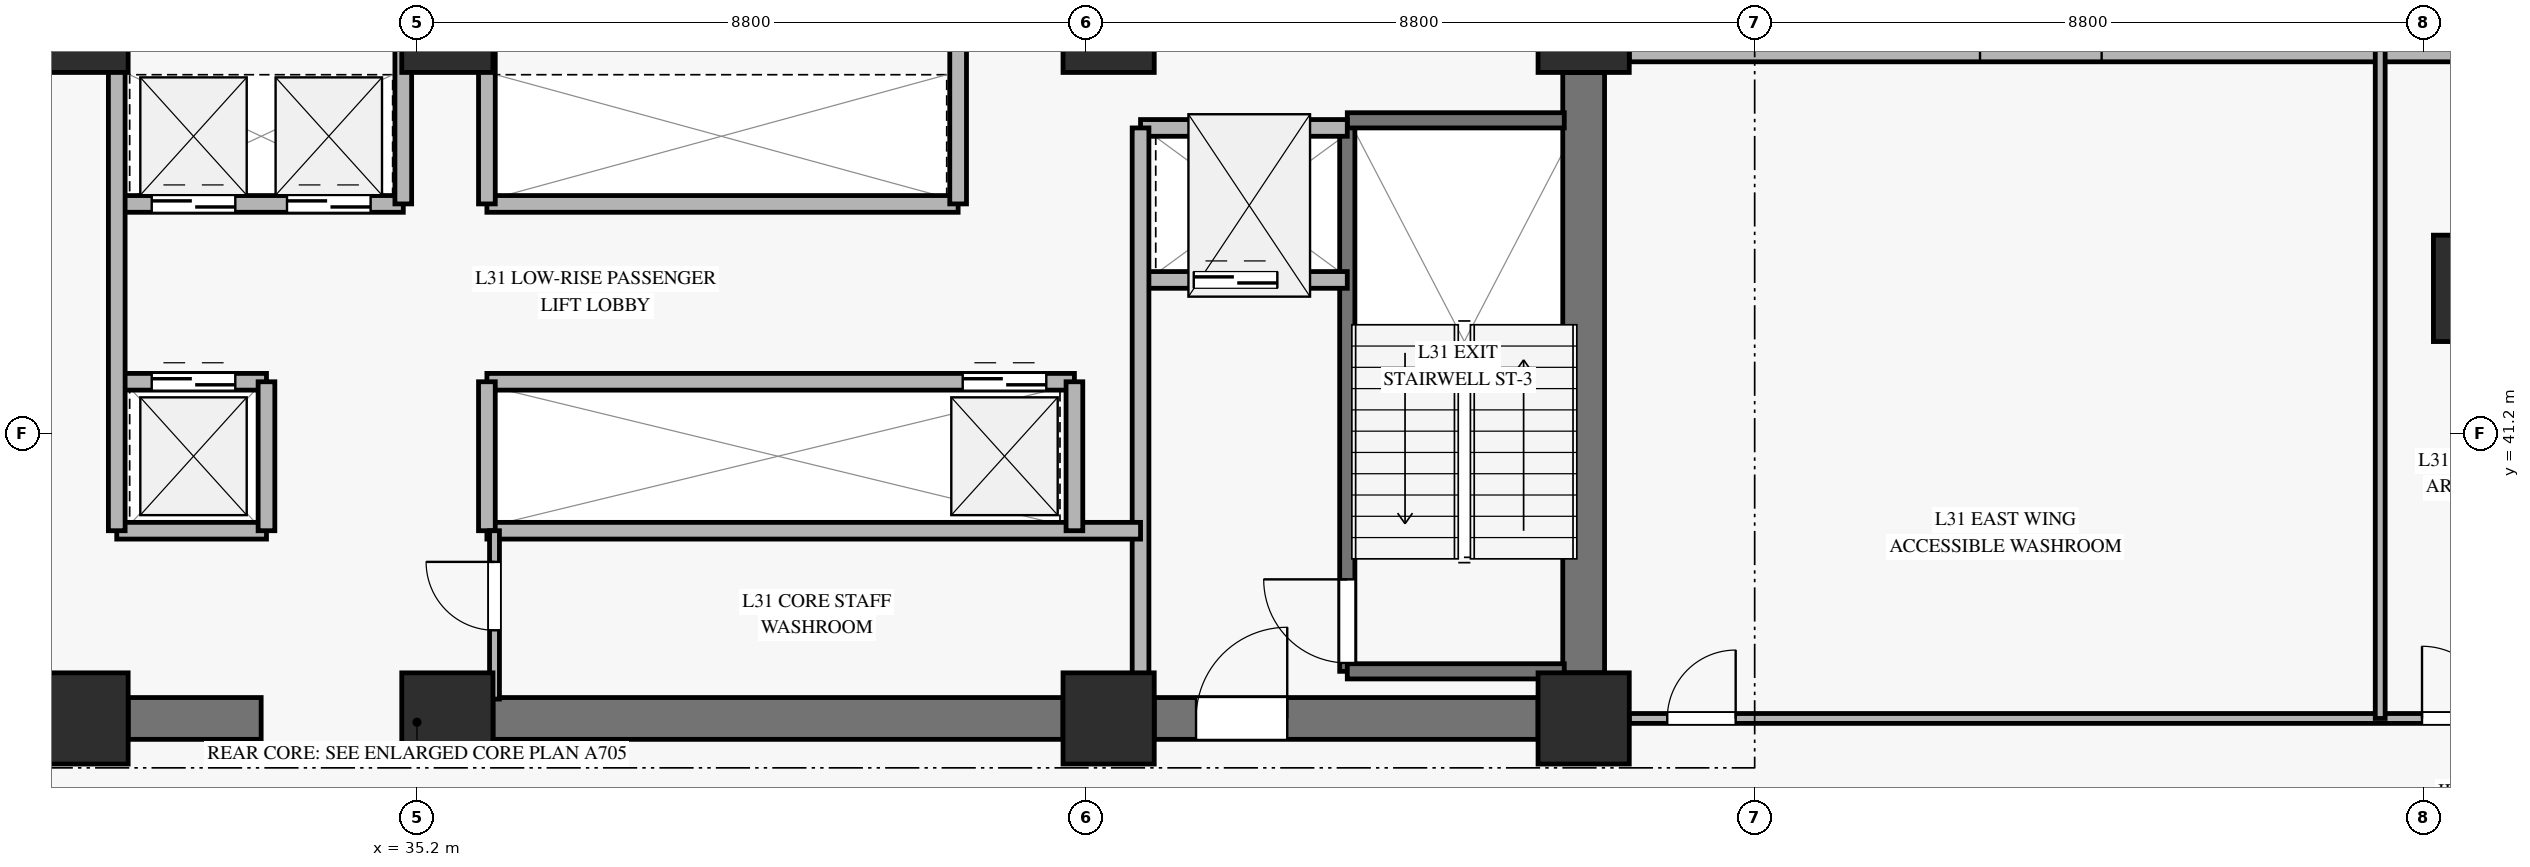
"""IFC4 building model, lengths in metres.
Left out: names, types, materials, properties, quantities, classifications, styles, units other than length and angle.
Written with IfcOpenShell. Run it as: python <this file> out.ifc"""

import sys

from ifc_helpers import new_model, si_unit, direction, frame, frame_2d, origin, origin_2d, place, context, subcontext, project, spatial, rectangle, hollow_rectangle, extrude, source, transform, mapped, element, fill, save


model = new_model("IFC4")
c1 = context("Model", 3, precision=1e-05, world=origin(), true_north=direction((0.0, 1.0)))
c2 = subcontext(c1, "Body", "Model", "MODEL_VIEW")
j1 = project(units=[si_unit("LENGTHUNIT", "METRE"), si_unit("PLANEANGLEUNIT", "RADIAN")], contexts=[c1])
p1 = place(None, origin())
s1 = spatial("IfcSite", under=j1, at=p1, CompositionType="ELEMENT")
p2 = place(p1, origin())
s2 = spatial("IfcBuilding", under=s1, at=p2, CompositionType="ELEMENT")
p3 = place(p2, frame((0.0, 0.0, 127.0)))
s3 = spatial("IfcBuildingStorey", under=s2, at=p3, CompositionType="ELEMENT", Elevation=127.0)
m1 = source(origin(), c2, "Body", "SweptSolid", [
    extrude(rectangle(XDim=1.2, YDim=1.2, at=origin_2d()), origin(), (0.0, 0.0, 1.0), 3.64),
])
for number, where, z_axis, x_axis in (
    (1, (30.8, 37.45, 0.0), (0.0, 0.0, 1.0), (1.0, 0.0, 0.0)),
    (2, (30.8, 46.55, 0.0), (0.0, 0.0, 1.0), (1.0, 0.0, 0.0)),
    (3, (35.6, 37.45, 0.0), (0.0, 0.0, 1.0), (1.0, 0.0, 0.0)),
    (4, (35.6, 46.55, 0.0), (0.0, 0.0, 1.0), (1.0, 0.0, 0.0)),
    (5, (44.3, 37.45, 0.0), (0.0, 0.0, 1.0), (1.0, 0.0, 0.0)),
    (6, (44.3, 46.55, 0.0), (0.0, 0.0, 1.0), (1.0, 0.0, 0.0)),
    (7, (50.55, 37.45, 0.0), (0.0, 0.0, 1.0), (1.0, 0.0, 0.0)),
    (8, (50.55, 46.55, 0.0), (0.0, 0.0, 1.0), (1.0, 0.0, 0.0)),
):
    element("IfcColumn", number, at=place(p3, frame(where, z_axis=z_axis, x_axis=x_axis)), inside=s3, PredefinedType="PILASTER", context=c2, shape_type="MappedRepresentation", body=[
        mapped(m1, transform((0.0, 0.0, 0.0), x_axis=(1.0, 0.0, 0.0), y_axis=(0.0, 1.0, 0.0), z_axis=(0.0, 0.0, 1.0), scale=1.0)),
    ])
p4 = place(p3, frame((31.4, 37.45, 0.0), z_axis=(0.0, 0.0, 1.0), x_axis=(1.0, 0.0, 0.0)))
e9 = element("IfcWall", 9, at=p4, inside=s3, PredefinedType="SHEAR", context=c2, shape_type="SweptSolid", body=[
    extrude(rectangle(XDim=1.75, YDim=0.55, at=frame_2d((0.875, 0.0))), origin(), (0.0, 0.0, 1.0), 3.64),
])
p5 = place(p3, frame((36.2, 37.45, 0.0), z_axis=(0.0, 0.0, 1.0), x_axis=(1.0, 0.0, 0.0)))
e10 = element("IfcWall", 10, at=p5, inside=s3, PredefinedType="SHEAR", context=c2, shape_type="SweptSolid", body=[
    extrude(rectangle(XDim=7.5, YDim=0.55, at=frame_2d((3.75, 0.0))), origin(), (0.0, 0.0, 1.0), 3.64),
])
p6 = place(p3, frame((44.9, 37.45, 0.0), z_axis=(0.0, 0.0, 1.0), x_axis=(1.0, 0.0, 0.0)))
e11 = element("IfcWall", 11, at=p6, inside=s3, PredefinedType="SHEAR", context=c2, shape_type="SweptSolid", body=[
    extrude(rectangle(XDim=5.05, YDim=0.55, at=frame_2d((2.525, 0.0))), origin(), (0.0, 0.0, 1.0), 3.64),
])
p7 = place(p6, frame((0.55, 0.0, 0.0)))
e12 = element("IfcOpeningElement", 12, at=p7, cuts=e11, PredefinedType="OPENING", context=c2, shape_type="SweptSolid", body=[
    extrude(rectangle(XDim=1.2, YDim=2.15, at=frame_2d((0.6, 1.075))), frame((0.0, 0.285, 0.0), z_axis=(0.0, -1.0, 0.0), x_axis=(1.0, 0.0, 0.0)), (0.0, 0.0, 1.0), 0.57),
])
p8 = place(p3, frame((50.55, 38.05, 0.0), z_axis=(0.0, 0.0, 1.0), x_axis=(0.0, 1.0, 0.0)))
e13 = element("IfcWall", 13, at=p8, inside=s3, PredefinedType="SHEAR", context=c2, shape_type="SweptSolid", body=[
    extrude(rectangle(XDim=7.9, YDim=0.55, at=frame_2d((3.95, 0.0))), origin(), (0.0, 0.0, 1.0), 3.64),
])
m2 = source(origin(), c2, "Body", "SweptSolid", [
    extrude(hollow_rectangle(XDim=1.4, YDim=1.4, WallThickness=0.065, at=origin_2d()), origin(), (0.0, 0.0, 1.0), 3.64),
])
p9 = place(p3, frame((62.43, 43.109, 0.0), z_axis=(0.0, 0.0, 1.0), x_axis=(1.0, 0.0, 0.0)))
e14 = element("IfcColumn", 14, at=p9, inside=s3, PredefinedType="COLUMN", context=c2, shape_type="MappedRepresentation", body=[
    mapped(m2, transform((0.0, 0.0, 0.0), x_axis=(1.0, 0.0, 0.0), y_axis=(0.0, 1.0, 0.0), z_axis=(0.0, 0.0, 1.0), scale=1.0)),
])
p10 = place(p3, frame((51.15, 46.25, 0.0), z_axis=(0.0, 0.0, 1.0), x_axis=(1.0, 0.0, 0.0)))
e15 = element("IfcWall", 15, at=p10, inside=s3, PredefinedType="SOLIDWALL", context=c2, shape_type="SweptSolid", body=[
    extrude(rectangle(XDim=10.83, YDim=0.32, at=frame_2d((5.415, 0.0))), origin(), (0.0, 0.0, 1.0), 3.12),
])
p11 = place(p10, frame((4.615, 0.0, 0.45)))
e16 = element("IfcOpeningElement", 16, at=p11, cuts=e15, PredefinedType="OPENING", context=c2, shape_type="SweptSolid", body=[
    extrude(rectangle(XDim=1.6, YDim=2.0, at=frame_2d((0.8, 1.0))), frame((0.0, 0.17, 0.0), z_axis=(0.0, -1.0, 0.0), x_axis=(1.0, 0.0, 0.0)), (0.0, 0.0, 1.0), 0.34),
])
p12 = place(p3, frame((47.44, 38.07, 0.0), z_axis=(0.0, 0.0, 1.0), x_axis=(0.0, 1.0, 0.0)))
e17 = element("IfcWall", 17, at=p12, inside=s3, PredefinedType="SOLIDWALL", context=c2, shape_type="SweptSolid", body=[
    extrude(rectangle(XDim=7.25, YDim=0.2, at=frame_2d((3.625, 0.0))), origin(), (0.0, 0.0, 1.0), 3.9),
])
p13 = place(p12, frame((0.11, 0.0, 0.0)))
e18 = element("IfcOpeningElement", 18, at=p13, cuts=e17, PredefinedType="OPENING", context=c2, shape_type="SweptSolid", body=[
    extrude(rectangle(XDim=1.1, YDim=2.15, at=frame_2d((0.55, 1.075))), frame((0.0, 0.11, 0.0), z_axis=(0.0, -1.0, 0.0), x_axis=(1.0, 0.0, 0.0)), (0.0, 0.0, 1.0), 0.22),
])
for number, where, z_axis, x_axis in (
    (19, (47.44, 45.32, 0.0), (0.0, 0.0, 1.0), (1.0, 0.0, 0.0)),
    (20, (47.44, 38.07, 0.0), (0.0, 0.0, 1.0), (1.0, 0.0, 0.0)),
):
    element("IfcWall", number, at=place(p3, frame(where, z_axis=z_axis, x_axis=x_axis)), inside=s3, PredefinedType="SOLIDWALL", context=c2, shape_type="SweptSolid", body=[
        extrude(rectangle(XDim=2.855, YDim=0.2, at=frame_2d((1.427, 0.0))), origin(), (0.0, 0.0, 1.0), 3.9),
    ])
p14 = place(p3, frame((44.72, 43.22, 0.0), z_axis=(0.0, 0.0, 1.0), x_axis=(1.0, 0.0, 0.0)))
e21 = element("IfcWall", 21, at=p14, inside=s3, PredefinedType="SOLIDWALL", context=c2, shape_type="SweptSolid", body=[
    extrude(rectangle(XDim=2.72, YDim=0.22, at=frame_2d((1.36, 0.0))), origin(), (0.0, 0.0, 1.0), 3.64),
])
p15 = place(p14, frame((0.7, 0.0, 0.0)))
e22 = element("IfcOpeningElement", 22, at=p15, cuts=e21, PredefinedType="OPENING", context=c2, shape_type="SweptSolid", body=[
    extrude(rectangle(XDim=1.1, YDim=2.2, at=frame_2d((0.55, 1.1))), frame((0.0, 0.12, 0.0), z_axis=(0.0, -1.0, 0.0), x_axis=(1.0, 0.0, 0.0)), (0.0, 0.0, 1.0), 0.24),
])
p16 = place(p3, frame((44.72, 45.22, 0.0), z_axis=(0.0, 0.0, 1.0), x_axis=(1.0, 0.0, 0.0)))
e23 = element("IfcWall", 23, at=p16, inside=s3, PredefinedType="SOLIDWALL", context=c2, shape_type="SweptSolid", body=[
    extrude(rectangle(XDim=2.72, YDim=0.22, at=frame_2d((1.36, 0.0))), origin(), (0.0, 0.0, 1.0), 3.64),
])
p17 = place(p3, frame((44.72, 37.705, 0.0), z_axis=(0.0, 0.0, 1.0), x_axis=(0.0, 1.0, 0.0)))
e24 = element("IfcWall", 24, at=p17, inside=s3, PredefinedType="SOLIDWALL", context=c2, shape_type="SweptSolid", body=[
    extrude(rectangle(XDim=7.515, YDim=0.22, at=frame_2d((3.757, 0.0))), origin(), (0.0, 0.0, 1.0), 3.64),
])
p18 = place(p3, frame((31.25, 44.22, 0.0), z_axis=(0.0, 0.0, 1.0), x_axis=(1.0, 0.0, 0.0)))
e25 = element("IfcWall", 25, at=p18, inside=s3, PredefinedType="SOLIDWALL", context=c2, shape_type="SweptSolid", body=[
    extrude(rectangle(XDim=3.77, YDim=0.22, at=frame_2d((1.885, 0.0))), origin(), (0.0, 0.0, 1.0), 3.64),
])
p19 = place(p18, frame((0.46, 0.0, 0.0)))
e26 = element("IfcOpeningElement", 26, at=p19, cuts=e25, PredefinedType="OPENING", context=c2, shape_type="SweptSolid", body=[
    extrude(rectangle(XDim=1.1, YDim=2.2, at=frame_2d((0.55, 1.1))), frame((0.0, 0.12, 0.0), z_axis=(0.0, -1.0, 0.0), x_axis=(1.0, 0.0, 0.0)), (0.0, 0.0, 1.0), 0.24),
])
p20 = place(p18, frame((2.24, 0.0, 0.0)))
e27 = element("IfcOpeningElement", 27, at=p20, cuts=e25, PredefinedType="OPENING", context=c2, shape_type="SweptSolid", body=[
    extrude(rectangle(XDim=1.1, YDim=2.2, at=frame_2d((0.55, 1.1))), frame((0.0, 0.12, 0.0), z_axis=(0.0, -1.0, 0.0), x_axis=(1.0, 0.0, 0.0)), (0.0, 0.0, 1.0), 0.24),
])
p21 = place(p3, frame((36.12, 44.22, 0.0), z_axis=(0.0, 0.0, 1.0), x_axis=(1.0, 0.0, 0.0)))
e28 = element("IfcWall", 28, at=p21, inside=s3, PredefinedType="SOLIDWALL", context=c2, shape_type="SweptSolid", body=[
    extrude(rectangle(XDim=6.2, YDim=0.22, at=frame_2d((3.1, 0.0))), origin(), (0.0, 0.0, 1.0), 3.64),
])
for number, where, z_axis, x_axis in (
    (29, (35.02, 44.22, 0.0), (0.0, 0.0, 1.0), (0.0, 1.0, 0.0)),
    (30, (36.12, 44.22, 0.0), (0.0, 0.0, 1.0), (0.0, 1.0, 0.0)),
    (31, (42.32, 44.22, 0.0), (0.0, 0.0, 1.0), (0.0, 1.0, 0.0)),
):
    element("IfcWall", number, at=place(p3, frame(where, z_axis=z_axis, x_axis=x_axis)), inside=s3, PredefinedType="SOLIDWALL", context=c2, shape_type="SweptSolid", body=[
        extrude(rectangle(XDim=2.075, YDim=0.22, at=frame_2d((1.038, 0.0))), origin(), (0.0, 0.0, 1.0), 3.64),
    ])
p22 = place(p3, frame((31.25, 41.88, 0.0), z_axis=(0.0, 0.0, 1.0), x_axis=(1.0, 0.0, 0.0)))
e32 = element("IfcWall", 32, at=p22, inside=s3, PredefinedType="SOLIDWALL", context=c2, shape_type="SweptSolid", body=[
    extrude(rectangle(XDim=1.97, YDim=0.22, at=frame_2d((0.985, 0.0))), origin(), (0.0, 0.0, 1.0), 3.64),
])
p23 = place(p22, frame((0.46, 0.0, 0.0)))
e33 = element("IfcOpeningElement", 33, at=p23, cuts=e32, PredefinedType="OPENING", context=c2, shape_type="SweptSolid", body=[
    extrude(rectangle(XDim=1.1, YDim=2.2, at=frame_2d((0.55, 1.1))), frame((0.0, 0.12, 0.0), z_axis=(0.0, -1.0, 0.0), x_axis=(1.0, 0.0, 0.0)), (0.0, 0.0, 1.0), 0.24),
])
p24 = place(p3, frame((36.12, 41.88, 0.0), z_axis=(0.0, 0.0, 1.0), x_axis=(1.0, 0.0, 0.0)))
e34 = element("IfcWall", 34, at=p24, inside=s3, PredefinedType="SOLIDWALL", context=c2, shape_type="SweptSolid", body=[
    extrude(rectangle(XDim=7.73, YDim=0.22, at=frame_2d((3.865, 0.0))), origin(), (0.0, 0.0, 1.0), 3.64),
])
p25 = place(p24, frame((6.26, 0.0, 0.0)))
e35 = element("IfcOpeningElement", 35, at=p25, cuts=e34, PredefinedType="OPENING", context=c2, shape_type="SweptSolid", body=[
    extrude(rectangle(XDim=1.1, YDim=2.2, at=frame_2d((0.55, 1.1))), frame((0.0, 0.12, 0.0), z_axis=(0.0, -1.0, 0.0), x_axis=(1.0, 0.0, 0.0)), (0.0, 0.0, 1.0), 0.24),
])
p26 = place(p3, frame((31.25, 39.92, 0.0), z_axis=(0.0, 0.0, 1.0), x_axis=(1.0, 0.0, 0.0)))
e36 = element("IfcWall", 36, at=p26, inside=s3, PredefinedType="SOLIDWALL", context=c2, shape_type="SweptSolid", body=[
    extrude(rectangle(XDim=1.97, YDim=0.22, at=frame_2d((0.985, 0.0))), origin(), (0.0, 0.0, 1.0), 3.64),
])
p27 = place(p3, frame((33.22, 39.92, 0.0), z_axis=(0.0, 0.0, 1.0), x_axis=(0.0, 1.0, 0.0)))
e37 = element("IfcWall", 37, at=p27, inside=s3, PredefinedType="SOLIDWALL", context=c2, shape_type="SweptSolid", body=[
    extrude(rectangle(XDim=1.96, YDim=0.22, at=frame_2d((0.98, 0.0))), origin(), (0.0, 0.0, 1.0), 3.64),
])
p28 = place(p3, frame((36.12, 39.92, 0.0), z_axis=(0.0, 0.0, 1.0), x_axis=(1.0, 0.0, 0.0)))
e38 = element("IfcWall", 38, at=p28, inside=s3, PredefinedType="SOLIDWALL", context=c2, shape_type="SweptSolid", body=[
    extrude(rectangle(XDim=8.6, YDim=0.22, at=frame_2d((4.3, 0.0))), origin(), (0.0, 0.0, 1.0), 2.925),
])
p29 = place(p3, frame((36.12, 39.92, 0.0), z_axis=(0.0, 0.0, 1.0), x_axis=(0.0, 1.0, 0.0)))
e39 = element("IfcWall", 39, at=p29, inside=s3, PredefinedType="SOLIDWALL", context=c2, shape_type="SweptSolid", body=[
    extrude(rectangle(XDim=1.96, YDim=0.22, at=frame_2d((0.98, 0.0))), origin(), (0.0, 0.0, 1.0), 3.64),
])
p30 = place(p3, frame((31.25, 39.92, 0.0), z_axis=(0.0, 0.0, 1.0), x_axis=(0.0, 1.0, 0.0)))
e40 = element("IfcWall", 40, at=p30, inside=s3, PredefinedType="SOLIDWALL", context=c2, shape_type="SweptSolid", body=[
    extrude(rectangle(XDim=6.375, YDim=0.22, at=frame_2d((3.188, 0.0))), origin(), (0.0, 0.0, 1.0), 3.64),
])
p31 = place(p3, frame((43.85, 39.92, 0.0), z_axis=(0.0, 0.0, 1.0), x_axis=(0.0, 1.0, 0.0)))
e41 = element("IfcWall", 41, at=p31, inside=s3, PredefinedType="SOLIDWALL", context=c2, shape_type="SweptSolid", body=[
    extrude(rectangle(XDim=1.96, YDim=0.22, at=frame_2d((0.98, 0.0))), origin(), (0.0, 0.0, 1.0), 3.64),
])
p32 = place(p3, frame((36.22, 37.705, 0.0), z_axis=(0.0, 0.0, 1.0), x_axis=(0.0, 1.0, 0.0)))
e42 = element("IfcWall", 42, at=p32, inside=s3, PredefinedType="PARTITIONING", context=c2, shape_type="SweptSolid", body=[
    extrude(rectangle(XDim=2.215, YDim=0.13, at=frame_2d((1.107, 0.0))), origin(), (0.0, 0.0, 1.0), 3.64),
])
p33 = place(p32, frame((0.905, 0.0, 0.0)))
e43 = element("IfcOpeningElement", 43, at=p33, cuts=e42, PredefinedType="OPENING", context=c2, shape_type="SweptSolid", body=[
    extrude(rectangle(XDim=0.9, YDim=2.1, at=frame_2d((0.45, 1.05))), frame((0.0, 0.075, 0.0), z_axis=(0.0, -1.0, 0.0), x_axis=(1.0, 0.0, 0.0)), (0.0, 0.0, 1.0), 0.15),
])
p34 = place(p3, frame((51.15, 37.45, 0.0), z_axis=(0.0, 0.0, 1.0), x_axis=(1.0, 0.0, 0.0)))
e44 = element("IfcWall", 44, at=p34, inside=s3, PredefinedType="PARTITIONING", context=c2, shape_type="SweptSolid", body=[
    extrude(rectangle(XDim=14.271, YDim=0.13, at=frame_2d((7.135, 0.0))), origin(), (0.0, 0.0, 1.0), 3.125),
])
p35 = place(p34, frame((0.5, 0.0, 0.0)))
e45 = element("IfcOpeningElement", 45, at=p35, cuts=e44, PredefinedType="OPENING", context=c2, shape_type="SweptSolid", body=[
    extrude(rectangle(XDim=0.9, YDim=2.1, at=frame_2d((0.45, 1.05))), frame((0.0, 0.075, 0.0), z_axis=(0.0, -1.0, 0.0), x_axis=(1.0, 0.0, 0.0)), (0.0, 0.0, 1.0), 0.15),
])
p36 = place(p34, frame((10.43, 0.0, 0.0)))
e46 = element("IfcOpeningElement", 46, at=p36, cuts=e44, PredefinedType="OPENING", context=c2, shape_type="SweptSolid", body=[
    extrude(rectangle(XDim=0.95, YDim=2.1, at=frame_2d((0.475, 1.05))), frame((0.0, 0.075, 0.0), z_axis=(0.0, -1.0, 0.0), x_axis=(1.0, 0.0, 0.0)), (0.0, 0.0, 1.0), 0.15),
])
p37 = place(p3, frame((61.03, 37.45, 0.0), z_axis=(0.0, 0.0, 1.0), x_axis=(0.0, 1.0, 0.0)))
e47 = element("IfcWall", 47, at=p37, inside=s3, PredefinedType="PARTITIONING", context=c2, shape_type="SweptSolid", body=[
    extrude(rectangle(XDim=8.8, YDim=0.13, at=frame_2d((4.4, 0.0))), origin(), (0.0, 0.0, 1.0), 3.64),
])
m3 = source(origin(), c2, "Body", "SweptSolid", [
    extrude(rectangle(XDim=1.1, YDim=2.15, at=frame_2d((0.55, 1.075))), frame((0.0, 0.025, 0.0), z_axis=(0.0, -1.0, 0.0), x_axis=(1.0, 0.0, 0.0)), (0.0, 0.0, 1.0), 0.05),
])
p38 = place(p13, origin())
e48 = element("IfcDoor", 48, at=p38, inside=s3, OperationType="SINGLE_SWING_RIGHT", PredefinedType="DOOR", context=c2, shape_type="MappedRepresentation", body=[
    mapped(m3, transform((0.0, 0.0, 0.0), x_axis=(1.0, 0.0, 0.0), y_axis=(0.0, 1.0, 0.0), z_axis=(0.0, 0.0, 1.0), scale=1.0)),
])
fill(e18, e48)
m4 = source(origin(), c2, "Body", "SweptSolid", [
    extrude(rectangle(XDim=1.1, YDim=2.2, at=frame_2d((0.55, 1.1))), frame((0.0, 0.025, 0.0), z_axis=(0.0, -1.0, 0.0), x_axis=(1.0, 0.0, 0.0)), (0.0, 0.0, 1.0), 0.05),
])
p39 = place(p15, origin())
e49 = element("IfcDoor", 49, at=p39, inside=s3, OperationType="SLIDING_TO_LEFT", PredefinedType="DOOR", context=c2, shape_type="MappedRepresentation", body=[
    mapped(m4, transform((0.0, 0.0, 0.0), x_axis=(1.0, 0.0, 0.0), y_axis=(0.0, 1.0, 0.0), z_axis=(0.0, 0.0, 1.0), scale=1.0)),
])
fill(e22, e49)
m5 = source(origin(), c2, "Body", "SweptSolid", [
    extrude(rectangle(XDim=1.2, YDim=2.15, at=frame_2d((0.6, 1.075))), frame((0.0, 0.025, 0.0), z_axis=(0.0, -1.0, 0.0), x_axis=(1.0, 0.0, 0.0)), (0.0, 0.0, 1.0), 0.05),
])
p40 = place(p7, origin())
e50 = element("IfcDoor", 50, at=p40, inside=s3, OperationType="SINGLE_SWING_RIGHT", PredefinedType="DOOR", context=c2, shape_type="MappedRepresentation", body=[
    mapped(m5, transform((0.0, 0.0, 0.0), x_axis=(1.0, 0.0, 0.0), y_axis=(0.0, 1.0, 0.0), z_axis=(0.0, 0.0, 1.0), scale=1.0)),
])
fill(e12, e50)
p41 = place(p19, origin())
e51 = element("IfcDoor", 51, at=p41, inside=s3, OperationType="SLIDING_TO_LEFT", PredefinedType="DOOR", context=c2, shape_type="MappedRepresentation", body=[
    mapped(m4, transform((0.0, 0.0, 0.0), x_axis=(1.0, 0.0, 0.0), y_axis=(0.0, 1.0, 0.0), z_axis=(0.0, 0.0, 1.0), scale=1.0)),
])
fill(e26, e51)
p42 = place(p20, origin())
e52 = element("IfcDoor", 52, at=p42, inside=s3, OperationType="SLIDING_TO_LEFT", PredefinedType="DOOR", context=c2, shape_type="MappedRepresentation", body=[
    mapped(m4, transform((0.0, 0.0, 0.0), x_axis=(1.0, 0.0, 0.0), y_axis=(0.0, 1.0, 0.0), z_axis=(0.0, 0.0, 1.0), scale=1.0)),
])
fill(e27, e52)
p43 = place(p23, origin())
e53 = element("IfcDoor", 53, at=p43, inside=s3, OperationType="SLIDING_TO_LEFT", PredefinedType="DOOR", context=c2, shape_type="MappedRepresentation", body=[
    mapped(m4, transform((0.0, 0.0, 0.0), x_axis=(1.0, 0.0, 0.0), y_axis=(0.0, 1.0, 0.0), z_axis=(0.0, 0.0, 1.0), scale=1.0)),
])
fill(e33, e53)
p44 = place(p25, origin())
e54 = element("IfcDoor", 54, at=p44, inside=s3, OperationType="SLIDING_TO_LEFT", PredefinedType="DOOR", context=c2, shape_type="MappedRepresentation", body=[
    mapped(m4, transform((0.0, 0.0, 0.0), x_axis=(1.0, 0.0, 0.0), y_axis=(0.0, 1.0, 0.0), z_axis=(0.0, 0.0, 1.0), scale=1.0)),
])
fill(e35, e54)
m6 = source(origin(), c2, "Body", "SweptSolid", [
    extrude(rectangle(XDim=0.9, YDim=2.1, at=frame_2d((0.45, 1.05))), frame((0.0, 0.025, 0.0), z_axis=(0.0, -1.0, 0.0), x_axis=(1.0, 0.0, 0.0)), (0.0, 0.0, 1.0), 0.05),
])
p45 = place(p33, origin())
e55 = element("IfcDoor", 55, at=p45, inside=s3, OperationType="SINGLE_SWING_RIGHT", PredefinedType="DOOR", context=c2, shape_type="MappedRepresentation", body=[
    mapped(m6, transform((0.0, 0.0, 0.0), x_axis=(1.0, 0.0, 0.0), y_axis=(0.0, 1.0, 0.0), z_axis=(0.0, 0.0, 1.0), scale=1.0)),
])
fill(e43, e55)
p46 = place(p35, origin())
e56 = element("IfcDoor", 56, at=p46, inside=s3, OperationType="SINGLE_SWING_RIGHT", PredefinedType="DOOR", context=c2, shape_type="MappedRepresentation", body=[
    mapped(m6, transform((0.0, 0.0, 0.0), x_axis=(1.0, 0.0, 0.0), y_axis=(0.0, 1.0, 0.0), z_axis=(0.0, 0.0, 1.0), scale=1.0)),
])
fill(e45, e56)
m7 = source(origin(), c2, "Body", "SweptSolid", [
    extrude(rectangle(XDim=0.95, YDim=2.1, at=frame_2d((0.475, 1.05))), frame((0.0, 0.025, 0.0), z_axis=(0.0, -1.0, 0.0), x_axis=(1.0, 0.0, 0.0)), (0.0, 0.0, 1.0), 0.05),
])
p47 = place(p36, origin())
e57 = element("IfcDoor", 57, at=p47, inside=s3, OperationType="SINGLE_SWING_LEFT", PredefinedType="DOOR", context=c2, shape_type="MappedRepresentation", body=[
    mapped(m7, transform((0.0, 0.0, 0.0), x_axis=(1.0, 0.0, 0.0), y_axis=(0.0, 1.0, 0.0), z_axis=(0.0, 0.0, 1.0), scale=1.0)),
])
fill(e46, e57)
save(model, sys.argv[1])
